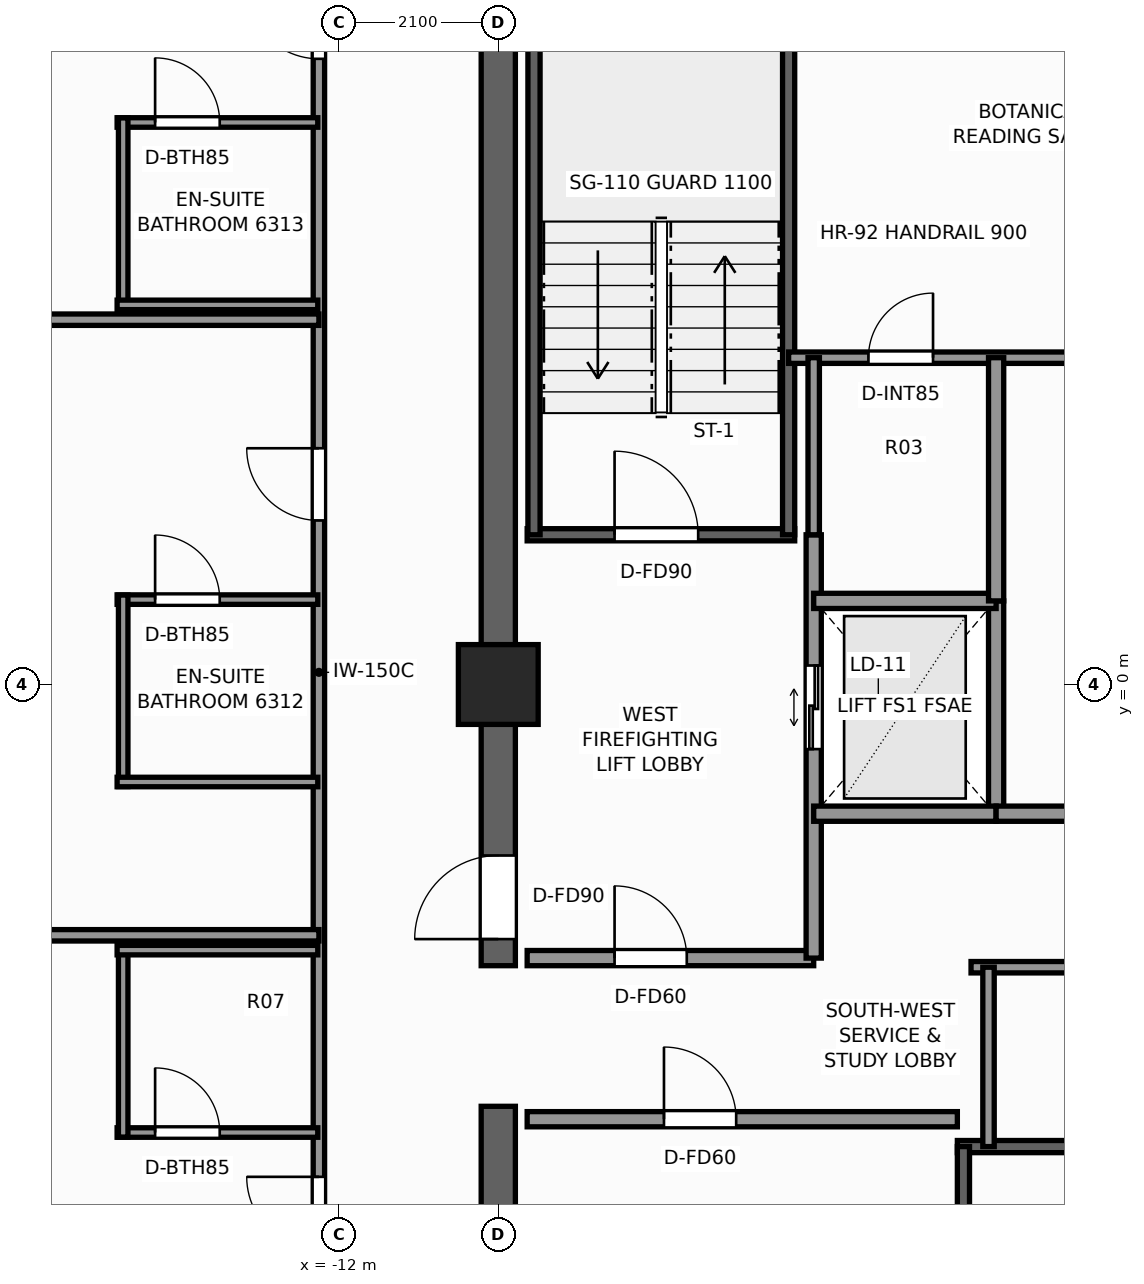
"""IFC4 building model, lengths in metres.
Left out: names, types, materials, properties, quantities, classifications, styles, units other than length and angle.
Written with IfcOpenShell. Run it as: python <this file> out.ifc"""

import sys

from ifc_helpers import new_model, si_unit, direction, frame, frame_2d, origin, origin_2d, place, context, subcontext, project, spatial, rectangle, extrude, element, fill, save


model = new_model("IFC4")
c1 = context("Model", 3, precision=1e-05, world=origin(), true_north=direction((0.0, 1.0)))
c2 = subcontext(c1, "Body", "Model", "MODEL_VIEW")
j1 = project(units=[si_unit("LENGTHUNIT", "METRE"), si_unit("PLANEANGLEUNIT", "RADIAN")], contexts=[c1])
p1 = place(None, origin())
s1 = spatial("IfcSite", under=j1, at=p1, CompositionType="ELEMENT")
p2 = place(p1, origin())
s2 = spatial("IfcBuilding", under=s1, at=p2, CompositionType="ELEMENT")
p3 = place(p2, frame((0.0, 0.0, 216.3)))
s3 = spatial("IfcBuildingStorey", under=s2, at=p3, CompositionType="ELEMENT", Elevation=216.3)
p4 = place(p3, frame((-9.9, -9.675, 0.0), z_axis=(0.0, 0.0, 1.0), x_axis=(0.0, 1.0, 0.0)))
e1 = element("IfcWall", 1, at=p4, inside=s3, PredefinedType="SHEAR", context=c2, shape_type="SweptSolid", body=[
    extrude(rectangle(XDim=4.125, YDim=0.45, at=frame_2d((2.062, 0.0))), origin(), (0.0, 0.0, 1.0), 3.3),
])
p5 = place(p3, frame((-9.9, -3.7, 0.0), z_axis=(0.0, 0.0, 1.0), x_axis=(0.0, 1.0, 0.0)))
e2 = element("IfcWall", 2, at=p5, inside=s3, PredefinedType="SHEAR", context=c2, shape_type="SweptSolid", body=[
    extrude(rectangle(XDim=13.375, YDim=0.45, at=frame_2d((6.688, 0.0))), origin(), (0.0, 0.0, 1.0), 3.3),
])
p6 = place(p5, frame((0.35, 0.0, 0.0)))
e3 = element("IfcOpeningElement", 3, at=p6, cuts=e2, PredefinedType="OPENING", context=c2, shape_type="SweptSolid", body=[
    extrude(rectangle(XDim=1.1, YDim=2.2, at=frame_2d((0.55, 1.1))), frame((0.0, 0.235, 0.0), z_axis=(0.0, -1.0, 0.0), x_axis=(1.0, 0.0, 0.0)), (0.0, 0.0, 1.0), 0.47),
])
p7 = place(p3, frame((-9.9, 0.0, 0.0), z_axis=(0.0, 0.0, 1.0), x_axis=(1.0, 0.0, 0.0)))
e4 = element("IfcColumn", 4, at=p7, inside=s3, PredefinedType="COLUMN", context=c2, shape_type="SweptSolid", body=[
    extrude(rectangle(XDim=1.05, YDim=1.05, at=origin_2d()), origin(), (0.0, 0.0, 1.0), 3.3),
])
p8 = place(p3, frame((-9.52, 1.97, 0.0), z_axis=(0.0, 0.0, 1.0), x_axis=(1.0, 0.0, 0.0)))
e5 = element("IfcWall", 5, at=p8, inside=s3, PredefinedType="SHEAR", context=c2, shape_type="SweptSolid", body=[
    extrude(rectangle(XDim=3.52, YDim=0.16, at=frame_2d((1.76, 0.0))), origin(), (0.0, 0.0, 1.0), 3.3),
])
p9 = place(p8, frame((1.15, 0.0, 0.0)))
e6 = element("IfcOpeningElement", 6, at=p9, cuts=e5, PredefinedType="OPENING", context=c2, shape_type="SweptSolid", body=[
    extrude(rectangle(XDim=1.1, YDim=2.2, at=frame_2d((0.55, 1.1))), frame((0.0, 0.09, 0.0), z_axis=(0.0, -1.0, 0.0), x_axis=(1.0, 0.0, 0.0)), (0.0, 0.0, 1.0), 0.18),
])
for number, where, z_axis, x_axis in (
    (7, (-9.43, 1.97, 0.0), (0.0, 0.0, 1.0), (0.0, 1.0, 0.0)),
    (8, (-6.08, 1.97, 0.0), (0.0, 0.0, 1.0), (0.0, 1.0, 0.0)),
):
    element("IfcWall", number, at=place(p3, frame(where, z_axis=z_axis, x_axis=x_axis)), inside=s3, PredefinedType="SHEAR", context=c2, shape_type="SweptSolid", body=[
        extrude(rectangle(XDim=7.56, YDim=0.16, at=frame_2d((3.78, 0.0))), origin(), (0.0, 0.0, 1.0), 3.3),
    ])
p10 = place(p3, frame((-3.86, -6.08, 0.0), z_axis=(0.0, 0.0, 1.0), x_axis=(1.0, 0.0, 0.0)))
e9 = element("IfcWall", 9, at=p10, inside=s3, PredefinedType="SHEAR", context=c2, shape_type="SweptSolid", body=[
    extrude(rectangle(XDim=7.72, YDim=0.16, at=frame_2d((3.86, 0.0))), origin(), (0.0, 0.0, 1.0), 3.3),
])
p11 = place(p3, frame((-3.78, -9.43, 0.0), z_axis=(0.0, 0.0, 1.0), x_axis=(0.0, 1.0, 0.0)))
e10 = element("IfcWall", 10, at=p11, inside=s3, PredefinedType="SHEAR", context=c2, shape_type="SweptSolid", body=[
    extrude(rectangle(XDim=3.35, YDim=0.16, at=frame_2d((1.675, 0.0))), origin(), (0.0, 0.0, 1.0), 3.3),
])
p12 = place(p3, frame((-9.52, -3.6, 0.0), z_axis=(0.0, 0.0, 1.0), x_axis=(1.0, 0.0, 0.0)))
e11 = element("IfcWall", 11, at=p12, inside=s3, PredefinedType="SOLIDWALL", context=c2, shape_type="SweptSolid", body=[
    extrude(rectangle(XDim=3.77, YDim=0.2, at=frame_2d((1.885, 0.0))), origin(), (0.0, 0.0, 1.0), 3.08),
])
p13 = place(p12, frame((1.15, 0.0, 0.0)))
e12 = element("IfcOpeningElement", 12, at=p13, cuts=e11, PredefinedType="OPENING", context=c2, shape_type="SweptSolid", body=[
    extrude(rectangle(XDim=0.95, YDim=2.06, at=frame_2d((0.475, 1.03))), frame((0.0, 0.11, 0.0), z_axis=(0.0, -1.0, 0.0), x_axis=(1.0, 0.0, 0.0)), (0.0, 0.0, 1.0), 0.22),
])
p14 = place(p3, frame((-5.75, -3.6, 0.0), z_axis=(0.0, 0.0, 1.0), x_axis=(0.0, 1.0, 0.0)))
e13 = element("IfcWall", 13, at=p14, inside=s3, PredefinedType="SOLIDWALL", context=c2, shape_type="SweptSolid", body=[
    extrude(rectangle(XDim=5.57, YDim=0.2, at=frame_2d((2.785, 0.0))), origin(), (0.0, 0.0, 1.0), 3.08),
])
p15 = place(p14, frame((2.75, 0.0, 0.0)))
e14 = element("IfcOpeningElement", 14, at=p15, cuts=e13, PredefinedType="OPENING", context=c2, shape_type="SweptSolid", body=[
    extrude(rectangle(XDim=1.1, YDim=2.2, at=frame_2d((0.55, 1.1))), frame((0.0, 0.11, 0.0), z_axis=(0.0, -1.0, 0.0), x_axis=(1.0, 0.0, 0.0)), (0.0, 0.0, 1.0), 0.22),
])
p16 = place(p3, frame((-3.35, -1.7, 0.0), z_axis=(0.0, 0.0, 1.0), x_axis=(0.0, 1.0, 0.0)))
e15 = element("IfcWall", 15, at=p16, inside=s3, PredefinedType="SOLIDWALL", context=c2, shape_type="SweptSolid", body=[
    extrude(rectangle(XDim=2.8, YDim=0.2, at=frame_2d((1.4, 0.0))), origin(), (0.0, 0.0, 1.0), 3.08),
])
for number, where, z_axis, x_axis in (
    (16, (-5.75, -1.7, 0.0), (0.0, 0.0, 1.0), (1.0, 0.0, 0.0)),
    (17, (-5.75, 1.1, 0.0), (0.0, 0.0, 1.0), (1.0, 0.0, 0.0)),
):
    element("IfcWall", number, at=place(p3, frame(where, z_axis=z_axis, x_axis=x_axis)), inside=s3, PredefinedType="SOLIDWALL", context=c2, shape_type="SweptSolid", body=[
        extrude(rectangle(XDim=2.4, YDim=0.2, at=frame_2d((1.2, 0.0))), origin(), (0.0, 0.0, 1.0), 3.08),
    ])
p17 = place(p3, frame((-6.08, 4.3, 0.0), z_axis=(0.0, 0.0, 1.0), x_axis=(1.0, 0.0, 0.0)))
e18 = element("IfcWall", 18, at=p17, inside=s3, PredefinedType="PARTITIONING", context=c2, shape_type="SweptSolid", body=[
    extrude(rectangle(XDim=6.3, YDim=0.15, at=frame_2d((3.15, 0.0))), origin(), (0.0, 0.0, 1.0), 3.08),
])
p18 = place(p17, frame((1.05, 0.0, 0.0)))
e19 = element("IfcOpeningElement", 19, at=p18, cuts=e18, PredefinedType="OPENING", context=c2, shape_type="SweptSolid", body=[
    extrude(rectangle(XDim=0.85, YDim=2.03, at=frame_2d((0.425, 1.015))), frame((0.0, 0.085, 0.0), z_axis=(0.0, -1.0, 0.0), x_axis=(1.0, 0.0, 0.0)), (0.0, 0.0, 1.0), 0.17),
])
p19 = place(p3, frame((-9.52, -5.72, 0.0), z_axis=(0.0, 0.0, 1.0), x_axis=(1.0, 0.0, 0.0)))
e20 = element("IfcWall", 20, at=p19, inside=s3, PredefinedType="SOLIDWALL", context=c2, shape_type="SweptSolid", body=[
    extrude(rectangle(XDim=5.66, YDim=0.2, at=frame_2d((2.83, 0.0))), origin(), (0.0, 0.0, 1.0), 3.08),
])
p20 = place(p19, frame((1.8, 0.0, 0.0)))
e21 = element("IfcOpeningElement", 21, at=p20, cuts=e20, PredefinedType="OPENING", context=c2, shape_type="SweptSolid", body=[
    extrude(rectangle(XDim=0.95, YDim=2.06, at=frame_2d((0.475, 1.03))), frame((0.0, 0.11, 0.0), z_axis=(0.0, -1.0, 0.0), x_axis=(1.0, 0.0, 0.0)), (0.0, 0.0, 1.0), 0.22),
])
p21 = place(p3, frame((-3.35, -1.7, 0.0), z_axis=(0.0, 0.0, 1.0), x_axis=(1.0, 0.0, 0.0)))
e22 = element("IfcWall", 22, at=p21, inside=s3, PredefinedType="SOLIDWALL", context=c2, shape_type="SweptSolid", body=[
    extrude(rectangle(XDim=6.7, YDim=0.2, at=frame_2d((3.35, 0.0))), origin(), (0.0, 0.0, 1.0), 3.08),
])
p22 = place(p3, frame((-3.35, 1.1, 0.0), z_axis=(0.0, 0.0, 1.0), x_axis=(0.0, 1.0, 0.0)))
e23 = element("IfcWall", 23, at=p22, inside=s3, PredefinedType="SOLIDWALL", context=c2, shape_type="SweptSolid", body=[
    extrude(rectangle(XDim=3.2, YDim=0.2, at=frame_2d((1.6, 0.0))), origin(), (0.0, 0.0, 1.0), 3.08),
])
p23 = place(p3, frame((-3.68, -3.72, 0.0), z_axis=(0.0, 0.0, 1.0), x_axis=(1.0, 0.0, 0.0)))
e24 = element("IfcWall", 24, at=p23, inside=s3, PredefinedType="PARTITIONING", context=c2, shape_type="SweptSolid", body=[
    extrude(rectangle(XDim=7.36, YDim=0.15, at=frame_2d((3.68, 0.0))), origin(), (0.0, 0.0, 1.0), 3.08),
])
p24 = place(p3, frame((-3.45, -6.08, 0.0), z_axis=(0.0, 0.0, 1.0), x_axis=(0.0, 1.0, 0.0)))
e25 = element("IfcWall", 25, at=p24, inside=s3, PredefinedType="PARTITIONING", context=c2, shape_type="SweptSolid", body=[
    extrude(rectangle(XDim=2.36, YDim=0.15, at=frame_2d((1.18, 0.0))), origin(), (0.0, 0.0, 1.0), 3.08),
])
p25 = place(p3, frame((-5.75, 1.97, 0.0), z_axis=(0.0, 0.0, 1.0), x_axis=(0.0, 1.0, 0.0)))
e26 = element("IfcWall", 26, at=p25, inside=s3, PredefinedType="PARTITIONING", context=c2, shape_type="SweptSolid", body=[
    extrude(rectangle(XDim=2.33, YDim=0.15, at=frame_2d((1.165, 0.0))), origin(), (0.0, 0.0, 1.0), 3.08),
])
p26 = place(p3, frame((-12.26, -12.26, 0.0), z_axis=(0.0, 0.0, 1.0), x_axis=(0.0, 1.0, 0.0)))
e27 = element("IfcWall", 27, at=p26, inside=s3, PredefinedType="PARTITIONING", context=c2, shape_type="SweptSolid", body=[
    extrude(rectangle(XDim=24.84, YDim=0.15, at=frame_2d((12.42, 0.0))), origin(), (0.0, 0.0, 1.0), 2.369),
])
p27 = place(p26, frame((2.944, 0.0, 0.0)))
e28 = element("IfcOpeningElement", 28, at=p27, cuts=e27, PredefinedType="OPENING", context=c2, shape_type="SweptSolid", body=[
    extrude(rectangle(XDim=0.9, YDim=2.06, at=frame_2d((0.45, 1.03))), frame((0.0, 0.085, 0.0), z_axis=(0.0, -1.0, 0.0), x_axis=(1.0, 0.0, 0.0)), (0.0, 0.0, 1.0), 0.17),
])
p28 = place(p26, frame((4.832, 0.0, 0.0)))
e29 = element("IfcOpeningElement", 29, at=p28, cuts=e27, PredefinedType="OPENING", context=c2, shape_type="SweptSolid", body=[
    extrude(rectangle(XDim=0.95, YDim=2.06, at=frame_2d((0.475, 1.03))), frame((0.0, 0.085, 0.0), z_axis=(0.0, -1.0, 0.0), x_axis=(1.0, 0.0, 0.0)), (0.0, 0.0, 1.0), 0.17),
])
p29 = place(p26, frame((14.418, 0.0, 0.0)))
e30 = element("IfcOpeningElement", 30, at=p29, cuts=e27, PredefinedType="OPENING", context=c2, shape_type="SweptSolid", body=[
    extrude(rectangle(XDim=0.95, YDim=2.06, at=frame_2d((0.475, 1.03))), frame((0.0, 0.085, 0.0), z_axis=(0.0, -1.0, 0.0), x_axis=(1.0, 0.0, 0.0)), (0.0, 0.0, 1.0), 0.17),
])
p30 = place(p26, frame((20.492, 0.0, 0.0)))
e31 = element("IfcOpeningElement", 31, at=p30, cuts=e27, PredefinedType="OPENING", context=c2, shape_type="SweptSolid", body=[
    extrude(rectangle(XDim=0.95, YDim=2.06, at=frame_2d((0.475, 1.03))), frame((0.0, 0.085, 0.0), z_axis=(0.0, -1.0, 0.0), x_axis=(1.0, 0.0, 0.0)), (0.0, 0.0, 1.0), 0.17),
])
p31 = place(p3, frame((-20.38, -3.3, 0.0), z_axis=(0.0, 0.0, 1.0), x_axis=(1.0, 0.0, 0.0)))
e32 = element("IfcWall", 32, at=p31, inside=s3, PredefinedType="PARTITIONING", context=c2, shape_type="SweptSolid", body=[
    extrude(rectangle(XDim=8.12, YDim=0.15, at=frame_2d((4.06, 0.0))), origin(), (0.0, 0.0, 1.0), 2.453),
])
p32 = place(p3, frame((-14.915, -5.895, 0.0), z_axis=(0.0, 0.0, 1.0), x_axis=(1.0, 0.0, 0.0)))
e33 = element("IfcWall", 33, at=p32, inside=s3, PredefinedType="PARTITIONING", context=c2, shape_type="SweptSolid", body=[
    extrude(rectangle(XDim=2.64, YDim=0.125, at=frame_2d((1.32, 0.0))), origin(), (0.0, 0.0, 1.0), 3.08),
])
p33 = place(p32, frame((0.5, 0.0, 0.0)))
e34 = element("IfcOpeningElement", 34, at=p33, cuts=e33, PredefinedType="OPENING", context=c2, shape_type="SweptSolid", body=[
    extrude(rectangle(XDim=0.85, YDim=2.03, at=frame_2d((0.425, 1.015))), frame((0.0, 0.073, 0.0), z_axis=(0.0, -1.0, 0.0), x_axis=(1.0, 0.0, 0.0)), (0.0, 0.0, 1.0), 0.145),
])
p34 = place(p3, frame((-14.835, -5.955, 0.0), z_axis=(0.0, 0.0, 1.0), x_axis=(0.0, 1.0, 0.0)))
e35 = element("IfcWall", 35, at=p34, inside=s3, PredefinedType="PARTITIONING", context=c2, shape_type="SweptSolid", body=[
    extrude(rectangle(XDim=2.52, YDim=0.125, at=frame_2d((1.26, 0.0))), origin(), (0.0, 0.0, 1.0), 2.369),
])
p35 = place(p3, frame((-14.915, -3.495, 0.0), z_axis=(0.0, 0.0, 1.0), x_axis=(1.0, 0.0, 0.0)))
e36 = element("IfcWall", 36, at=p35, inside=s3, PredefinedType="PARTITIONING", context=c2, shape_type="SweptSolid", body=[
    extrude(rectangle(XDim=2.64, YDim=0.125, at=frame_2d((1.32, 0.0))), origin(), (0.0, 0.0, 1.0), 3.08),
])
p36 = place(p3, frame((-20.38, 4.8, 0.0), z_axis=(0.0, 0.0, 1.0), x_axis=(1.0, 0.0, 0.0)))
e37 = element("IfcWall", 37, at=p36, inside=s3, PredefinedType="PARTITIONING", context=c2, shape_type="SweptSolid", body=[
    extrude(rectangle(XDim=8.12, YDim=0.15, at=frame_2d((4.06, 0.0))), origin(), (0.0, 0.0, 1.0), 2.369),
])
p37 = place(p3, frame((-14.915, 1.117, 0.0), z_axis=(0.0, 0.0, 1.0), x_axis=(1.0, 0.0, 0.0)))
e38 = element("IfcWall", 38, at=p37, inside=s3, PredefinedType="PARTITIONING", context=c2, shape_type="SweptSolid", body=[
    extrude(rectangle(XDim=2.64, YDim=0.125, at=frame_2d((1.32, 0.0))), origin(), (0.0, 0.0, 1.0), 3.08),
])
p38 = place(p37, frame((0.5, 0.0, 0.0)))
e39 = element("IfcOpeningElement", 39, at=p38, cuts=e38, PredefinedType="OPENING", context=c2, shape_type="SweptSolid", body=[
    extrude(rectangle(XDim=0.85, YDim=2.03, at=frame_2d((0.425, 1.015))), frame((0.0, 0.073, 0.0), z_axis=(0.0, -1.0, 0.0), x_axis=(1.0, 0.0, 0.0)), (0.0, 0.0, 1.0), 0.145),
])
p39 = place(p3, frame((-14.835, -1.343, 0.0), z_axis=(0.0, 0.0, 1.0), x_axis=(0.0, 1.0, 0.0)))
e40 = element("IfcWall", 40, at=p39, inside=s3, PredefinedType="PARTITIONING", context=c2, shape_type="SweptSolid", body=[
    extrude(rectangle(XDim=2.52, YDim=0.125, at=frame_2d((1.26, 0.0))), origin(), (0.0, 0.0, 1.0), 2.605),
])
p40 = place(p3, frame((-14.915, -1.283, 0.0), z_axis=(0.0, 0.0, 1.0), x_axis=(1.0, 0.0, 0.0)))
e41 = element("IfcWall", 41, at=p40, inside=s3, PredefinedType="PARTITIONING", context=c2, shape_type="SweptSolid", body=[
    extrude(rectangle(XDim=2.64, YDim=0.125, at=frame_2d((1.32, 0.0))), origin(), (0.0, 0.0, 1.0), 3.08),
])
p41 = place(p3, frame((-14.915, 7.395, 0.0), z_axis=(0.0, 0.0, 1.0), x_axis=(1.0, 0.0, 0.0)))
e42 = element("IfcWall", 42, at=p41, inside=s3, PredefinedType="PARTITIONING", context=c2, shape_type="SweptSolid", body=[
    extrude(rectangle(XDim=2.64, YDim=0.125, at=frame_2d((1.32, 0.0))), origin(), (0.0, 0.0, 1.0), 3.08),
])
p42 = place(p41, frame((0.5, 0.0, 0.0)))
e43 = element("IfcOpeningElement", 43, at=p42, cuts=e42, PredefinedType="OPENING", context=c2, shape_type="SweptSolid", body=[
    extrude(rectangle(XDim=0.85, YDim=2.03, at=frame_2d((0.425, 1.015))), frame((0.0, 0.073, 0.0), z_axis=(0.0, -1.0, 0.0), x_axis=(1.0, 0.0, 0.0)), (0.0, 0.0, 1.0), 0.145),
])
p43 = place(p3, frame((-14.835, 4.935, 0.0), z_axis=(0.0, 0.0, 1.0), x_axis=(0.0, 1.0, 0.0)))
e44 = element("IfcWall", 44, at=p43, inside=s3, PredefinedType="PARTITIONING", context=c2, shape_type="SweptSolid", body=[
    extrude(rectangle(XDim=2.52, YDim=0.125, at=frame_2d((1.26, 0.0))), origin(), (0.0, 0.0, 1.0), 3.08),
])
p44 = place(p3, frame((-14.915, 4.995, 0.0), z_axis=(0.0, 0.0, 1.0), x_axis=(1.0, 0.0, 0.0)))
e45 = element("IfcWall", 45, at=p44, inside=s3, PredefinedType="PARTITIONING", context=c2, shape_type="SweptSolid", body=[
    extrude(rectangle(XDim=2.64, YDim=0.125, at=frame_2d((1.32, 0.0))), origin(), (0.0, 0.0, 1.0), 3.08),
])
p45 = place(p9, origin())
e46 = element("IfcDoor", 46, at=p45, inside=s3, OperationType="SINGLE_SWING_LEFT", PredefinedType="DOOR", context=c2, shape_type="SweptSolid", body=[
    extrude(rectangle(XDim=1.1, YDim=2.2, at=frame_2d((0.55, 1.1))), frame((0.0, 0.025, 0.0), z_axis=(0.0, -1.0, 0.0), x_axis=(1.0, 0.0, 0.0)), (0.0, 0.0, 1.0), 0.05),
])
fill(e6, e46)
p46 = place(p6, origin())
e47 = element("IfcDoor", 47, at=p46, inside=s3, OperationType="SINGLE_SWING_LEFT", PredefinedType="DOOR", context=c2, shape_type="SweptSolid", body=[
    extrude(rectangle(XDim=1.1, YDim=2.2, at=frame_2d((0.55, 1.1))), frame((0.0, 0.025, 0.0), z_axis=(0.0, -1.0, 0.0), x_axis=(1.0, 0.0, 0.0)), (0.0, 0.0, 1.0), 0.05),
])
fill(e3, e47)
p47 = place(p15, origin())
e48 = element("IfcDoor", 48, at=p47, inside=s3, OperationType="DOUBLE_DOOR_SLIDING", PredefinedType="DOOR", context=c2, shape_type="SweptSolid", body=[
    extrude(rectangle(XDim=1.1, YDim=2.2, at=frame_2d((0.55, 1.1))), frame((0.0, 0.025, 0.0), z_axis=(0.0, -1.0, 0.0), x_axis=(1.0, 0.0, 0.0)), (0.0, 0.0, 1.0), 0.05),
])
fill(e14, e48)
p48 = place(p20, origin())
e49 = element("IfcDoor", 49, at=p48, inside=s3, OperationType="SINGLE_SWING_LEFT", PredefinedType="DOOR", context=c2, shape_type="SweptSolid", body=[
    extrude(rectangle(XDim=0.95, YDim=2.06, at=frame_2d((0.475, 1.03))), frame((0.0, 0.025, 0.0), z_axis=(0.0, -1.0, 0.0), x_axis=(1.0, 0.0, 0.0)), (0.0, 0.0, 1.0), 0.05),
])
fill(e21, e49)
p49 = place(p13, origin())
e50 = element("IfcDoor", 50, at=p49, inside=s3, OperationType="SINGLE_SWING_LEFT", PredefinedType="DOOR", context=c2, shape_type="SweptSolid", body=[
    extrude(rectangle(XDim=0.95, YDim=2.06, at=frame_2d((0.475, 1.03))), frame((0.0, 0.025, 0.0), z_axis=(0.0, -1.0, 0.0), x_axis=(1.0, 0.0, 0.0)), (0.0, 0.0, 1.0), 0.05),
])
fill(e12, e50)
p50 = place(p18, origin())
e51 = element("IfcDoor", 51, at=p50, inside=s3, OperationType="SINGLE_SWING_RIGHT", PredefinedType="DOOR", context=c2, shape_type="SweptSolid", body=[
    extrude(rectangle(XDim=0.85, YDim=2.03, at=frame_2d((0.425, 1.015))), frame((0.0, 0.025, 0.0), z_axis=(0.0, -1.0, 0.0), x_axis=(1.0, 0.0, 0.0)), (0.0, 0.0, 1.0), 0.05),
])
fill(e19, e51)
p51 = place(p33, origin())
e52 = element("IfcDoor", 52, at=p51, inside=s3, OperationType="SINGLE_SWING_LEFT", PredefinedType="DOOR", context=c2, shape_type="SweptSolid", body=[
    extrude(rectangle(XDim=0.85, YDim=2.03, at=frame_2d((0.425, 1.015))), frame((0.0, 0.025, 0.0), z_axis=(0.0, -1.0, 0.0), x_axis=(1.0, 0.0, 0.0)), (0.0, 0.0, 1.0), 0.05),
])
fill(e34, e52)
p52 = place(p28, origin())
e53 = element("IfcDoor", 53, at=p52, inside=s3, OperationType="SINGLE_SWING_RIGHT", PredefinedType="DOOR", context=c2, shape_type="SweptSolid", body=[
    extrude(rectangle(XDim=0.95, YDim=2.06, at=frame_2d((0.475, 1.03))), frame((0.0, 0.025, 0.0), z_axis=(0.0, -1.0, 0.0), x_axis=(1.0, 0.0, 0.0)), (0.0, 0.0, 1.0), 0.05),
])
fill(e29, e53)
p53 = place(p38, origin())
e54 = element("IfcDoor", 54, at=p53, inside=s3, OperationType="SINGLE_SWING_LEFT", PredefinedType="DOOR", context=c2, shape_type="SweptSolid", body=[
    extrude(rectangle(XDim=0.85, YDim=2.03, at=frame_2d((0.425, 1.015))), frame((0.0, 0.025, 0.0), z_axis=(0.0, -1.0, 0.0), x_axis=(1.0, 0.0, 0.0)), (0.0, 0.0, 1.0), 0.05),
])
fill(e39, e54)
p54 = place(p29, origin())
e55 = element("IfcDoor", 55, at=p54, inside=s3, OperationType="SINGLE_SWING_RIGHT", PredefinedType="DOOR", context=c2, shape_type="SweptSolid", body=[
    extrude(rectangle(XDim=0.95, YDim=2.06, at=frame_2d((0.475, 1.03))), frame((0.0, 0.025, 0.0), z_axis=(0.0, -1.0, 0.0), x_axis=(1.0, 0.0, 0.0)), (0.0, 0.0, 1.0), 0.05),
])
fill(e30, e55)
p55 = place(p42, origin())
e56 = element("IfcDoor", 56, at=p55, inside=s3, OperationType="SINGLE_SWING_LEFT", PredefinedType="DOOR", context=c2, shape_type="SweptSolid", body=[
    extrude(rectangle(XDim=0.85, YDim=2.03, at=frame_2d((0.425, 1.015))), frame((0.0, 0.025, 0.0), z_axis=(0.0, -1.0, 0.0), x_axis=(1.0, 0.0, 0.0)), (0.0, 0.0, 1.0), 0.05),
])
fill(e43, e56)
p56 = place(p30, origin())
e57 = element("IfcDoor", 57, at=p56, inside=s3, OperationType="SINGLE_SWING_RIGHT", PredefinedType="DOOR", context=c2, shape_type="SweptSolid", body=[
    extrude(rectangle(XDim=0.95, YDim=2.06, at=frame_2d((0.475, 1.03))), frame((0.0, 0.025, 0.0), z_axis=(0.0, -1.0, 0.0), x_axis=(1.0, 0.0, 0.0)), (0.0, 0.0, 1.0), 0.05),
])
fill(e31, e57)
save(model, sys.argv[1])
